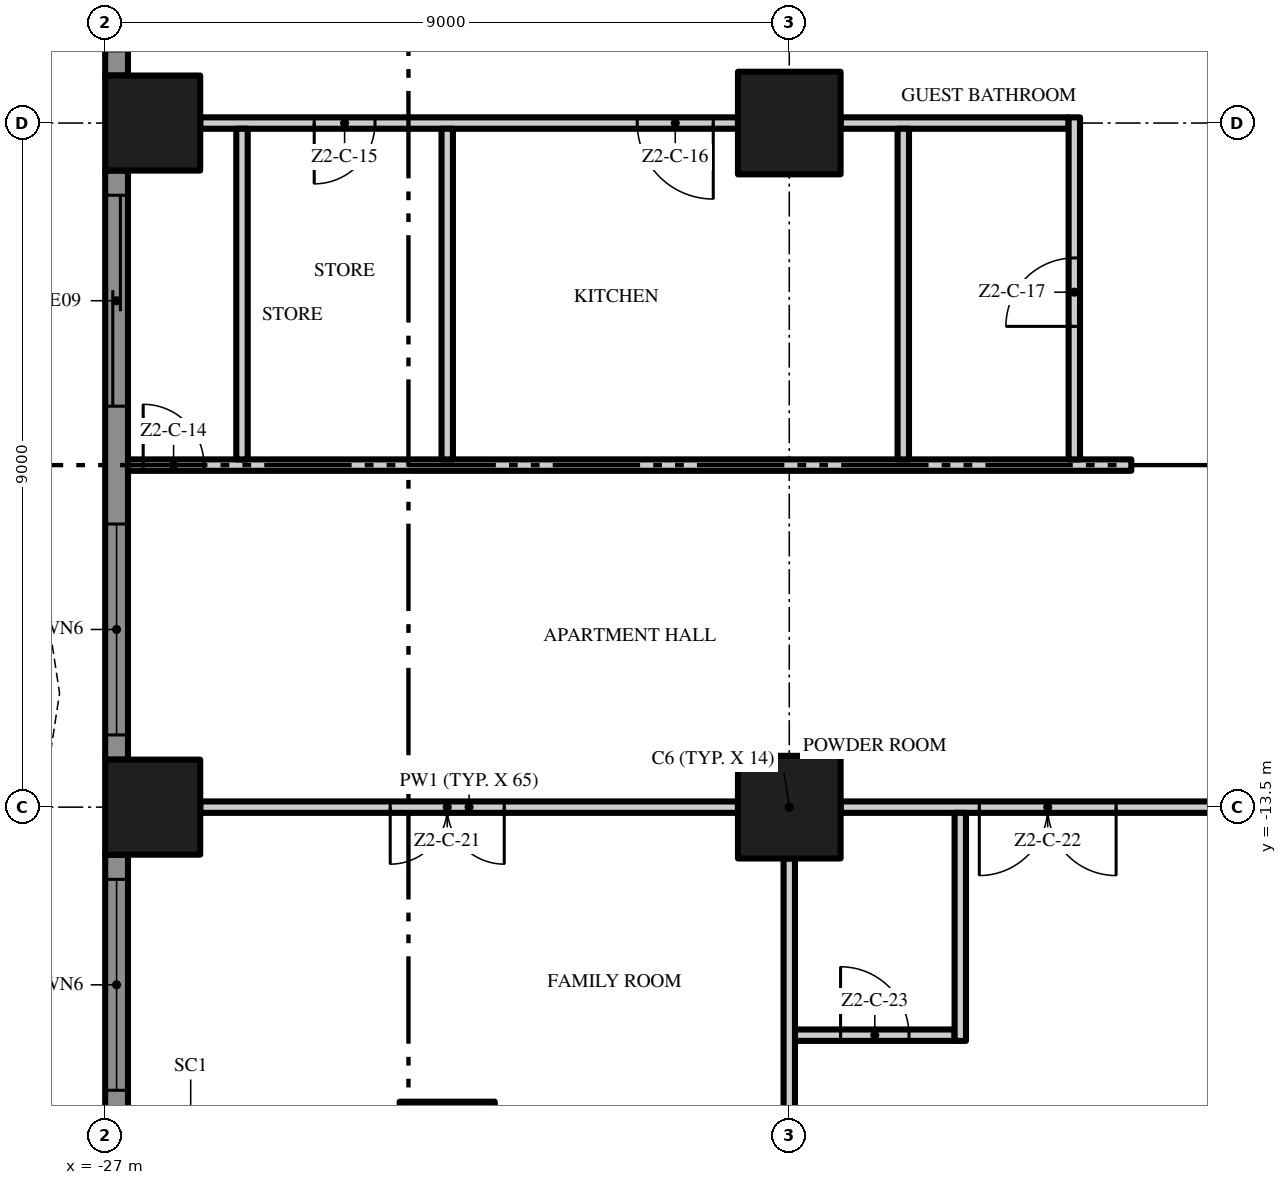
"""IFC4 building model, lengths in metres.
Left out: names, types, materials, properties, quantities, classifications, styles, units other than length and angle.
Written with IfcOpenShell. Run it as: python <this file> out.ifc"""

import sys

from ifc_helpers import new_model, si_unit, direction, frame, frame_2d, origin, origin_2d, place, context, subcontext, project, spatial, polyline, rectangle, outline, extrude, element, fill, save


model = new_model("IFC4")
c1 = context("Model", 3, precision=1e-05, world=origin(), true_north=direction((0.0, 1.0)))
c2 = subcontext(c1, "Body", "Model", "MODEL_VIEW")
j1 = project(units=[si_unit("LENGTHUNIT", "METRE"), si_unit("PLANEANGLEUNIT", "RADIAN")], contexts=[c1])
p1 = place(None, origin())
s1 = spatial("IfcSite", under=j1, at=p1, CompositionType="ELEMENT")
p2 = place(p1, origin())
s2 = spatial("IfcBuilding", under=s1, at=p2, CompositionType="ELEMENT")
p3 = place(p2, frame((0.0, 0.0, 99.8)))
s3 = spatial("IfcBuildingStorey", under=s2, at=p3, CompositionType="ELEMENT", Elevation=99.8)
for number, where, z_axis, x_axis in (
    (1, (-18.0, -13.5, 0.0), (0.0, 0.0, 1.0), (1.0, 0.0, 0.0)),
    (2, (-18.0, -4.5, 0.0), (0.0, 0.0, 1.0), (1.0, 0.0, 0.0)),
):
    element("IfcColumn", number, at=place(p3, frame(where, z_axis=z_axis, x_axis=x_axis)), inside=s3, PredefinedType="COLUMN", context=c2, shape_type="SweptSolid", body=[
        extrude(rectangle(XDim=1.35, YDim=1.35, at=origin_2d()), origin(), (0.0, 0.0, 1.0), 3.5),
    ])
for number, where, z_axis, x_axis in (
    (3, (-26.375, -13.5, 0.0), (0.0, 0.0, 1.0), (1.0, 0.0, 0.0)),
    (4, (-22.5, -18.0, 0.0), (0.0, 0.0, 1.0), (1.0, 0.0, 0.0)),
    (5, (-26.375, -4.5, 0.0), (0.0, 0.0, 1.0), (1.0, 0.0, 0.0)),
):
    element("IfcColumn", number, at=place(p3, frame(where, z_axis=z_axis, x_axis=x_axis)), inside=s3, PredefinedType="COLUMN", context=c2, shape_type="SweptSolid", body=[
        extrude(rectangle(XDim=1.25, YDim=1.25, at=origin_2d()), origin(), (0.0, 0.0, 1.0), 3.5),
    ])
p4 = place(p3, frame((-26.85, -3.875, 0.0), z_axis=(0.0, 0.0, 1.0), x_axis=(0.0, 1.0, 0.0)))
e6 = element("IfcWall", 6, at=p4, inside=s3, PredefinedType="SOLIDWALL", context=c2, shape_type="SweptSolid", body=[
    extrude(rectangle(XDim=7.75, YDim=0.3, at=frame_2d((3.875, 0.0))), origin(), (0.0, 0.0, 1.0), 3.5),
])
p5 = place(p4, frame((4.65, 0.0, 0.45)))
e7 = element("IfcOpeningElement", 7, at=p5, cuts=e6, PredefinedType="OPENING", context=c2, shape_type="SweptSolid", body=[
    extrude(rectangle(XDim=2.775, YDim=2.65, at=frame_2d((1.387, 1.325))), frame((0.0, 0.16, 0.0), z_axis=(0.0, -1.0, 0.0), x_axis=(1.0, 0.0, 0.0)), (0.0, 0.0, 1.0), 0.32),
])
p6 = place(p4, frame((0.325, 0.0, 0.0)))
e8 = element("IfcOpeningElement", 8, at=p6, cuts=e6, PredefinedType="OPENING", context=c2, shape_type="SweptSolid", body=[
    extrude(rectangle(XDim=2.775, YDim=2.4, at=frame_2d((1.387, 1.2))), frame((0.0, 0.16, 0.0), z_axis=(0.0, -1.0, 0.0), x_axis=(1.0, 0.0, 0.0)), (0.0, 0.0, 1.0), 0.32),
])
p7 = place(p3, frame((-26.85, -12.875, 0.0), z_axis=(0.0, 0.0, 1.0), x_axis=(0.0, 1.0, 0.0)))
e9 = element("IfcWall", 9, at=p7, inside=s3, PredefinedType="SOLIDWALL", context=c2, shape_type="SweptSolid", body=[
    extrude(rectangle(XDim=7.75, YDim=0.3, at=frame_2d((3.875, 0.0))), origin(), (0.0, 0.0, 1.0), 3.5),
])
p8 = place(p7, frame((4.65, 0.0, 0.0)))
e10 = element("IfcOpeningElement", 10, at=p8, cuts=e9, PredefinedType="OPENING", context=c2, shape_type="SweptSolid", body=[
    extrude(rectangle(XDim=2.775, YDim=2.4, at=frame_2d((1.387, 1.2))), frame((0.0, 0.16, 0.0), z_axis=(0.0, -1.0, 0.0), x_axis=(1.0, 0.0, 0.0)), (0.0, 0.0, 1.0), 0.32),
])
p9 = place(p7, frame((0.325, 0.0, 0.45)))
e11 = element("IfcOpeningElement", 11, at=p9, cuts=e9, PredefinedType="OPENING", context=c2, shape_type="SweptSolid", body=[
    extrude(rectangle(XDim=2.775, YDim=2.65, at=frame_2d((1.387, 1.325))), frame((0.0, 0.16, 0.0), z_axis=(0.0, -1.0, 0.0), x_axis=(1.0, 0.0, 0.0)), (0.0, 0.0, 1.0), 0.32),
])
p10 = place(p3, frame((-26.85, -18.0, 0.0), z_axis=(0.0, 0.0, 1.0), x_axis=(0.0, 1.0, 0.0)))
e12 = element("IfcWall", 12, at=p10, inside=s3, PredefinedType="SOLIDWALL", context=c2, shape_type="SweptSolid", body=[
    extrude(rectangle(XDim=3.875, YDim=0.3, at=frame_2d((1.938, 0.0))), origin(), (0.0, 0.0, 1.0), 3.5),
])
p11 = place(p10, frame((0.775, 0.0, 0.45)))
e13 = element("IfcOpeningElement", 13, at=p11, cuts=e12, PredefinedType="OPENING", context=c2, shape_type="SweptSolid", body=[
    extrude(rectangle(XDim=2.775, YDim=2.65, at=frame_2d((1.387, 1.325))), frame((0.0, 0.16, 0.0), z_axis=(0.0, -1.0, 0.0), x_axis=(1.0, 0.0, 0.0)), (0.0, 0.0, 1.0), 0.32),
])
p12 = place(p3, origin())
e14 = element("IfcWall", 14, at=p12, inside=s3, PredefinedType="USERDEFINED", context=c2, shape_type="SweptSolid", body=[
    extrude(outline(polyline([(-27.6, 18.0), (-27.829, 16.5), (-28.429, 15.0), (-29.171, 13.5), (-29.771, 12.0), (-30.0, 10.5), (-29.771, 9.0), (-29.171, 7.5), (-28.429, 6.0), (-27.829, 4.5), (-27.6, 3.0), (-27.829, 1.5), (-28.429, 0.0), (-29.171, -1.5), (-29.771, -3.0), (-30.0, -4.5), (-29.771, -6.0), (-29.171, -7.5), (-28.429, -9.0), (-27.829, -10.5), (-27.6, -12.0), (-27.829, -13.5), (-28.429, -15.0), (-29.171, -16.5), (-29.771, -18.0), (-29.539, -18.093), (-28.942, -16.602), (-28.201, -15.102), (-27.586, -13.566), (-27.347, -12.0), (-27.586, -10.434), (-28.201, -8.898), (-28.942, -7.398), (-29.528, -5.934), (-29.747, -4.5), (-29.528, -3.066), (-28.942, -1.602), (-28.201, -0.102), (-27.586, 1.434), (-27.347, 3.0), (-27.586, 4.566), (-28.201, 6.102), (-28.942, 7.602), (-29.528, 9.066), (-29.747, 10.5), (-29.528, 11.934), (-28.942, 13.398), (-28.201, 14.898), (-27.586, 16.434), (-27.353, 17.962), (-27.6, 18.0)])), origin(), (0.0, 0.0, 1.0), 0.9),
])
p13 = place(p3, frame((-17.925, -16.5, 0.0), z_axis=(0.0, 0.0, 1.0), x_axis=(1.0, 0.0, 0.0)))
e15 = element("IfcWall", 15, at=p13, inside=s3, PredefinedType="PARTITIONING", context=c2, shape_type="SweptSolid", body=[
    extrude(rectangle(XDim=2.1, YDim=0.15, at=frame_2d((1.05, 0.0))), origin(), (0.0, 0.0, 1.0), 3.5),
])
p14 = place(p13, frame((0.6, 0.0, 0.0)))
e16 = element("IfcOpeningElement", 16, at=p14, cuts=e15, PredefinedType="OPENING", context=c2, shape_type="SweptSolid", body=[
    extrude(rectangle(XDim=0.9, YDim=2.1, at=frame_2d((0.45, 1.05))), frame((0.0, 0.085, 0.0), z_axis=(0.0, -1.0, 0.0), x_axis=(1.0, 0.0, 0.0)), (0.0, 0.0, 1.0), 0.17),
])
p15 = place(p3, frame((-18.675, -13.5, 0.0), z_axis=(0.0, 0.0, 1.0), x_axis=(-1.0, 0.0, 0.0)))
e17 = element("IfcWall", 17, at=p15, inside=s3, PredefinedType="PARTITIONING", context=c2, shape_type="SweptSolid", body=[
    extrude(rectangle(XDim=7.075, YDim=0.15, at=frame_2d((3.538, 0.0))), origin(), (0.0, 0.0, 1.0), 3.5),
])
p16 = place(p15, frame((3.075, 0.0, 0.0)))
e18 = element("IfcOpeningElement", 18, at=p16, cuts=e17, PredefinedType="OPENING", context=c2, shape_type="SweptSolid", body=[
    extrude(rectangle(XDim=1.5, YDim=2.4, at=frame_2d((0.75, 1.2))), frame((0.0, 0.085, 0.0), z_axis=(0.0, -1.0, 0.0), x_axis=(1.0, 0.0, 0.0)), (0.0, 0.0, 1.0), 0.17),
])
p17 = place(p3, frame((-9.675, -13.5, 0.0), z_axis=(0.0, 0.0, 1.0), x_axis=(-1.0, 0.0, 0.0)))
e19 = element("IfcWall", 19, at=p17, inside=s3, PredefinedType="PARTITIONING", context=c2, shape_type="SweptSolid", body=[
    extrude(rectangle(XDim=7.65, YDim=0.15, at=frame_2d((3.825, 0.0))), origin(), (0.0, 0.0, 1.0), 3.5),
])
p18 = place(p17, frame((4.025, 0.0, 0.0)))
e20 = element("IfcOpeningElement", 20, at=p18, cuts=e19, PredefinedType="OPENING", context=c2, shape_type="SweptSolid", body=[
    extrude(rectangle(XDim=1.8, YDim=2.4, at=frame_2d((0.9, 1.2))), frame((0.0, 0.085, 0.0), z_axis=(0.0, -1.0, 0.0), x_axis=(1.0, 0.0, 0.0)), (0.0, 0.0, 1.0), 0.17),
])
p19 = place(p3, frame((-26.7, -9.0, 0.0), z_axis=(0.0, 0.0, 1.0), x_axis=(1.0, 0.0, 0.0)))
e21 = element("IfcWall", 21, at=p19, inside=s3, PredefinedType="PARTITIONING", context=c2, shape_type="SweptSolid", body=[
    extrude(rectangle(XDim=13.2, YDim=0.15, at=frame_2d((6.6, 0.0))), origin(), (0.0, 0.0, 1.0), 3.5),
])
p20 = place(p19, frame((0.2, 0.0, 0.0)))
e22 = element("IfcOpeningElement", 22, at=p20, cuts=e21, PredefinedType="OPENING", context=c2, shape_type="SweptSolid", body=[
    extrude(rectangle(XDim=0.8, YDim=2.0, at=frame_2d((0.4, 1.0))), frame((0.0, 0.085, 0.0), z_axis=(0.0, -1.0, 0.0), x_axis=(1.0, 0.0, 0.0)), (0.0, 0.0, 1.0), 0.17),
])
p21 = place(p3, frame((-18.675, -4.5, 0.0), z_axis=(0.0, 0.0, 1.0), x_axis=(-1.0, 0.0, 0.0)))
e23 = element("IfcWall", 23, at=p21, inside=s3, PredefinedType="PARTITIONING", context=c2, shape_type="SweptSolid", body=[
    extrude(rectangle(XDim=7.075, YDim=0.15, at=frame_2d((3.538, 0.0))), origin(), (0.0, 0.0, 1.0), 3.5),
])
p22 = place(p21, frame((4.775, 0.0, 0.0)))
e24 = element("IfcOpeningElement", 24, at=p22, cuts=e23, PredefinedType="OPENING", context=c2, shape_type="SweptSolid", body=[
    extrude(rectangle(XDim=0.8, YDim=2.0, at=frame_2d((0.4, 1.0))), frame((0.0, 0.085, 0.0), z_axis=(0.0, -1.0, 0.0), x_axis=(1.0, 0.0, 0.0)), (0.0, 0.0, 1.0), 0.17),
])
p23 = place(p21, frame((0.325, 0.0, 0.0)))
e25 = element("IfcOpeningElement", 25, at=p23, cuts=e23, PredefinedType="OPENING", context=c2, shape_type="SweptSolid", body=[
    extrude(rectangle(XDim=1.0, YDim=2.4, at=frame_2d((0.5, 1.2))), frame((0.0, 0.085, 0.0), z_axis=(0.0, -1.0, 0.0), x_axis=(1.0, 0.0, 0.0)), (0.0, 0.0, 1.0), 0.17),
])
p24 = place(p3, frame((-17.325, -4.5, 0.0), z_axis=(0.0, 0.0, 1.0), x_axis=(1.0, 0.0, 0.0)))
e26 = element("IfcWall", 26, at=p24, inside=s3, PredefinedType="PARTITIONING", context=c2, shape_type="SweptSolid", body=[
    extrude(rectangle(XDim=3.0, YDim=0.15, at=frame_2d((1.5, 0.0))), origin(), (0.0, 0.0, 1.0), 3.5),
])
for number, where, z_axis, x_axis in (
    (27, (-25.2, -8.925, 0.0), (0.0, 0.0, 1.0), (0.0, 1.0, 0.0)),
    (28, (-22.5, -8.925, 0.0), (0.0, 0.0, 1.0), (0.0, 1.0, 0.0)),
):
    element("IfcWall", number, at=place(p3, frame(where, z_axis=z_axis, x_axis=x_axis)), inside=s3, PredefinedType="PARTITIONING", context=c2, shape_type="SweptSolid", body=[
        extrude(rectangle(XDim=4.35, YDim=0.15, at=frame_2d((2.175, 0.0))), origin(), (0.0, 0.0, 1.0), 3.5),
    ])
p25 = place(p3, frame((-18.0, -21.25, 0.0), z_axis=(0.0, 0.0, 1.0), x_axis=(0.0, 1.0, 0.0)))
e29 = element("IfcWall", 29, at=p25, inside=s3, PredefinedType="PARTITIONING", context=c2, shape_type="SweptSolid", body=[
    extrude(rectangle(XDim=7.075, YDim=0.15, at=frame_2d((3.538, 0.0))), origin(), (0.0, 0.0, 1.0), 3.5),
])
p26 = place(p3, frame((-16.5, -8.925, 0.0), z_axis=(0.0, 0.0, 1.0), x_axis=(0.0, 1.0, 0.0)))
e30 = element("IfcWall", 30, at=p26, inside=s3, PredefinedType="PARTITIONING", context=c2, shape_type="SweptSolid", body=[
    extrude(rectangle(XDim=4.35, YDim=0.15, at=frame_2d((2.175, 0.0))), origin(), (0.0, 0.0, 1.0), 3.5),
])
p27 = place(p3, frame((-15.75, -16.575, 0.0), z_axis=(0.0, 0.0, 1.0), x_axis=(0.0, 1.0, 0.0)))
e31 = element("IfcWall", 31, at=p27, inside=s3, PredefinedType="PARTITIONING", context=c2, shape_type="SweptSolid", body=[
    extrude(rectangle(XDim=3.0, YDim=0.15, at=frame_2d((1.5, 0.0))), origin(), (0.0, 0.0, 1.0), 3.5),
])
p28 = place(p3, frame((-14.25, -8.925, 0.0), z_axis=(0.0, 0.0, 1.0), x_axis=(0.0, 1.0, 0.0)))
e32 = element("IfcWall", 32, at=p28, inside=s3, PredefinedType="PARTITIONING", context=c2, shape_type="SweptSolid", body=[
    extrude(rectangle(XDim=4.5, YDim=0.15, at=frame_2d((2.25, 0.0))), origin(), (0.0, 0.0, 1.0), 3.5),
])
p29 = place(p28, frame((1.75, 0.0, 0.0)))
e33 = element("IfcOpeningElement", 33, at=p29, cuts=e32, PredefinedType="OPENING", context=c2, shape_type="SweptSolid", body=[
    extrude(rectangle(XDim=0.9, YDim=2.1, at=frame_2d((0.45, 1.05))), frame((0.0, 0.085, 0.0), z_axis=(0.0, -1.0, 0.0), x_axis=(1.0, 0.0, 0.0)), (0.0, 0.0, 1.0), 0.17),
])
p30 = place(p8, origin())
e34 = element("IfcDoor", 34, at=p30, inside=s3, OperationType="SINGLE_SWING_LEFT", PredefinedType="DOOR", context=c2, shape_type="SweptSolid", body=[
    extrude(rectangle(XDim=2.775, YDim=2.4, at=frame_2d((1.387, 1.2))), frame((0.0, 0.025, 0.0), z_axis=(0.0, -1.0, 0.0), x_axis=(1.0, 0.0, 0.0)), (0.0, 0.0, 1.0), 0.05),
])
fill(e10, e34)
p31 = place(p9, origin())
e35 = element("IfcWindow", 35, at=p31, inside=s3, PartitioningType="SINGLE_PANEL", PredefinedType="WINDOW", context=c2, shape_type="SweptSolid", body=[
    extrude(rectangle(XDim=2.775, YDim=2.65, at=frame_2d((1.387, 1.325))), frame((0.0, 0.03, 0.0), z_axis=(0.0, -1.0, 0.0), x_axis=(1.0, 0.0, 0.0)), (0.0, 0.0, 1.0), 0.06),
])
fill(e11, e35)
p32 = place(p11, origin())
e36 = element("IfcWindow", 36, at=p32, inside=s3, PartitioningType="SINGLE_PANEL", PredefinedType="WINDOW", context=c2, shape_type="SweptSolid", body=[
    extrude(rectangle(XDim=2.775, YDim=2.65, at=frame_2d((1.387, 1.325))), frame((0.0, 0.03, 0.0), z_axis=(0.0, -1.0, 0.0), x_axis=(1.0, 0.0, 0.0)), (0.0, 0.0, 1.0), 0.06),
])
fill(e13, e36)
p33 = place(p20, origin())
e37 = element("IfcDoor", 37, at=p33, inside=s3, OperationType="SINGLE_SWING_LEFT", PredefinedType="DOOR", context=c2, shape_type="SweptSolid", body=[
    extrude(rectangle(XDim=0.8, YDim=2.0, at=frame_2d((0.4, 1.0))), frame((0.0, 0.025, 0.0), z_axis=(0.0, -1.0, 0.0), x_axis=(1.0, 0.0, 0.0)), (0.0, 0.0, 1.0), 0.05),
])
fill(e22, e37)
p34 = place(p22, origin())
e38 = element("IfcDoor", 38, at=p34, inside=s3, OperationType="SINGLE_SWING_RIGHT", PredefinedType="DOOR", context=c2, shape_type="SweptSolid", body=[
    extrude(rectangle(XDim=0.8, YDim=2.0, at=frame_2d((0.4, 1.0))), frame((0.0, 0.025, 0.0), z_axis=(0.0, -1.0, 0.0), x_axis=(1.0, 0.0, 0.0)), (0.0, 0.0, 1.0), 0.05),
])
fill(e24, e38)
p35 = place(p23, origin())
e39 = element("IfcDoor", 39, at=p35, inside=s3, OperationType="SINGLE_SWING_LEFT", PredefinedType="DOOR", context=c2, shape_type="SweptSolid", body=[
    extrude(rectangle(XDim=1.0, YDim=2.4, at=frame_2d((0.5, 1.2))), frame((0.0, 0.025, 0.0), z_axis=(0.0, -1.0, 0.0), x_axis=(1.0, 0.0, 0.0)), (0.0, 0.0, 1.0), 0.05),
])
fill(e25, e39)
p36 = place(p29, origin())
e40 = element("IfcDoor", 40, at=p36, inside=s3, OperationType="SINGLE_SWING_LEFT", PredefinedType="DOOR", context=c2, shape_type="SweptSolid", body=[
    extrude(rectangle(XDim=0.9, YDim=2.1, at=frame_2d((0.45, 1.05))), frame((0.0, 0.025, 0.0), z_axis=(0.0, -1.0, 0.0), x_axis=(1.0, 0.0, 0.0)), (0.0, 0.0, 1.0), 0.05),
])
fill(e33, e40)
p37 = place(p16, origin())
e41 = element("IfcDoor", 41, at=p37, inside=s3, OperationType="DOUBLE_DOOR_SINGLE_SWING", PredefinedType="DOOR", context=c2, shape_type="SweptSolid", body=[
    extrude(rectangle(XDim=1.5, YDim=2.4, at=frame_2d((0.75, 1.2))), frame((0.0, 0.025, 0.0), z_axis=(0.0, -1.0, 0.0), x_axis=(1.0, 0.0, 0.0)), (0.0, 0.0, 1.0), 0.05),
])
fill(e18, e41)
p38 = place(p18, origin())
e42 = element("IfcDoor", 42, at=p38, inside=s3, OperationType="DOUBLE_DOOR_SINGLE_SWING", PredefinedType="DOOR", context=c2, shape_type="SweptSolid", body=[
    extrude(rectangle(XDim=1.8, YDim=2.4, at=frame_2d((0.9, 1.2))), frame((0.0, 0.025, 0.0), z_axis=(0.0, -1.0, 0.0), x_axis=(1.0, 0.0, 0.0)), (0.0, 0.0, 1.0), 0.05),
])
fill(e20, e42)
p39 = place(p14, origin())
e43 = element("IfcDoor", 43, at=p39, inside=s3, OperationType="SINGLE_SWING_LEFT", PredefinedType="DOOR", context=c2, shape_type="SweptSolid", body=[
    extrude(rectangle(XDim=0.9, YDim=2.1, at=frame_2d((0.45, 1.05))), frame((0.0, 0.025, 0.0), z_axis=(0.0, -1.0, 0.0), x_axis=(1.0, 0.0, 0.0)), (0.0, 0.0, 1.0), 0.05),
])
fill(e16, e43)
save(model, sys.argv[1])
